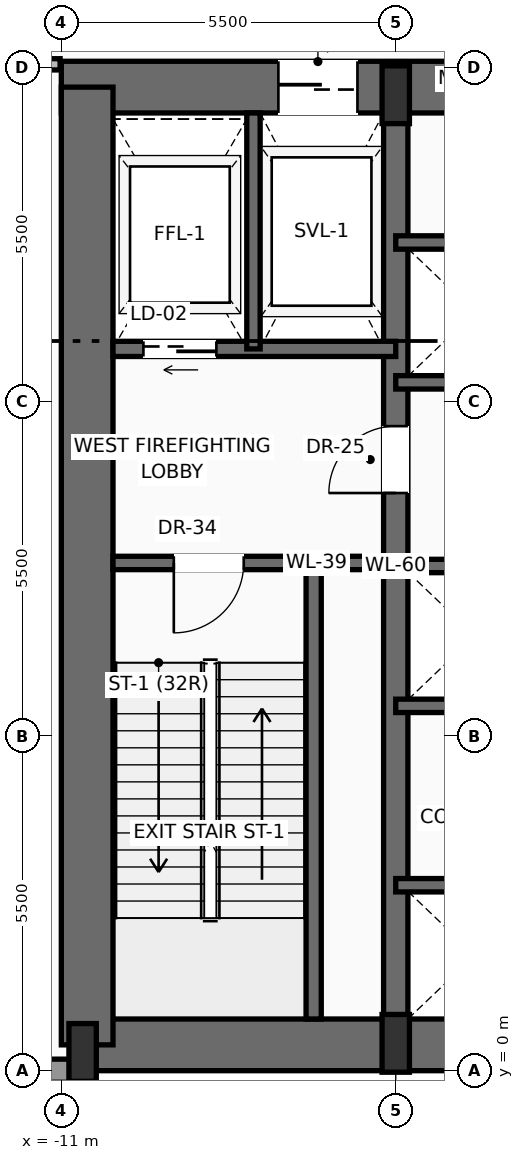
"""IFC4 building model, lengths in metres.
Left out: names, types, materials, properties, quantities, classifications, styles, units other than length and angle.
Written with IfcOpenShell. Run it as: python <this file> out.ifc"""

import sys

from ifc_helpers import new_model, si_unit, direction, frame, frame_2d, origin, origin_2d, place, context, subcontext, project, spatial, rectangle, extrude, source, transform, mapped, element, fill, save


model = new_model("IFC4")
c1 = context("Model", 3, precision=1e-05, world=origin(), true_north=direction((0.0, 1.0)))
c2 = subcontext(c1, "Body", "Model", "MODEL_VIEW")
j1 = project(units=[si_unit("LENGTHUNIT", "METRE"), si_unit("PLANEANGLEUNIT", "RADIAN")], contexts=[c1])
p1 = place(None, origin())
s1 = spatial("IfcSite", under=j1, at=p1, CompositionType="ELEMENT")
p2 = place(p1, origin())
s2 = spatial("IfcBuilding", under=s1, at=p2, CompositionType="ELEMENT")
p3 = place(p2, frame((0.0, 0.0, 5.5)))
s3 = spatial("IfcBuildingStorey", under=s2, at=p3, CompositionType="ELEMENT", Elevation=5.5)
p4 = place(p3, frame((-10.65, 0.425, 0.0), z_axis=(0.0, 0.0, 1.0), x_axis=(1.0, 0.0, 0.0)))
e1 = element("IfcWall", 1, at=p4, inside=s3, PredefinedType="SHEAR", context=c2, shape_type="SweptSolid", body=[
    extrude(rectangle(XDim=21.3, YDim=0.85, at=frame_2d((10.65, 0.0))), origin(), (0.0, 0.0, 1.0), 5.17),
])
p5 = place(p3, frame((-11.0, 16.175, 0.0), z_axis=(0.0, 0.0, 1.0), x_axis=(1.0, 0.0, 0.0)))
e2 = element("IfcWall", 2, at=p5, inside=s3, PredefinedType="SHEAR", context=c2, shape_type="SweptSolid", body=[
    extrude(rectangle(XDim=22.0, YDim=0.85, at=frame_2d((11.0, 0.0))), origin(), (0.0, 0.0, 1.0), 5.17),
])
p6 = place(p5, frame((3.57, 0.0, 0.0)))
e3 = element("IfcOpeningElement", 3, at=p6, cuts=e2, PredefinedType="OPENING", context=c2, shape_type="SweptSolid", body=[
    extrude(rectangle(XDim=1.3, YDim=2.3, at=frame_2d((0.65, 1.15))), frame((0.0, 0.435, 0.0), z_axis=(0.0, -1.0, 0.0), x_axis=(1.0, 0.0, 0.0)), (0.0, 0.0, 1.0), 0.87),
])
p7 = place(p5, frame((10.0, 0.0, 0.0)))
e4 = element("IfcOpeningElement", 4, at=p7, cuts=e2, PredefinedType="OPENING", context=c2, shape_type="SweptSolid", body=[
    extrude(rectangle(XDim=2.0, YDim=2.4, at=frame_2d((1.0, 1.2))), frame((0.0, 0.435, 0.0), z_axis=(0.0, -1.0, 0.0), x_axis=(1.0, 0.0, 0.0)), (0.0, 0.0, 1.0), 0.87),
])
p8 = place(p3, frame((-10.575, 0.425, 0.0), z_axis=(0.0, 0.0, 1.0), x_axis=(0.0, 1.0, 0.0)))
e5 = element("IfcWall", 5, at=p8, inside=s3, PredefinedType="SHEAR", context=c2, shape_type="SweptSolid", body=[
    extrude(rectangle(XDim=15.75, YDim=0.85, at=frame_2d((7.875, 0.0))), origin(), (0.0, 0.0, 1.0), 5.17),
])
p9 = place(p3, frame((-5.5, 0.425, 0.0), z_axis=(0.0, 0.0, 1.0), x_axis=(0.0, 1.0, 0.0)))
e6 = element("IfcWall", 6, at=p9, inside=s3, PredefinedType="SHEAR", context=c2, shape_type="SweptSolid", body=[
    extrude(rectangle(XDim=15.75, YDim=0.4, at=frame_2d((7.875, 0.0))), origin(), (0.0, 0.0, 1.0), 5.17),
])
p10 = place(p9, frame((9.075, 0.0, 0.0)))
e7 = element("IfcOpeningElement", 7, at=p10, cuts=e6, PredefinedType="OPENING", context=c2, shape_type="SweptSolid", body=[
    extrude(rectangle(XDim=1.1, YDim=2.2, at=frame_2d((0.55, 1.1))), frame((0.0, 0.21, 0.0), z_axis=(0.0, -1.0, 0.0), x_axis=(1.0, 0.0, 0.0)), (0.0, 0.0, 1.0), 0.42),
])
m1 = source(origin(), c2, "Body", "SweptSolid", [
    extrude(rectangle(XDim=0.45, YDim=0.95, at=origin_2d()), origin(), (0.0, 0.0, 1.0), 5.5),
])
for number, where, z_axis, x_axis in (
    (8, (-10.65, 0.3, 0.0), (0.0, 0.0, 1.0), (1.0, 0.0, 0.0)),
    (9, (-5.5, 0.45, 0.0), (0.0, 0.0, 1.0), (1.0, 0.0, 0.0)),
    (10, (-5.5, 16.05, 0.0), (0.0, 0.0, 1.0), (1.0, 0.0, 0.0)),
):
    element("IfcColumn", number, at=place(p3, frame(where, z_axis=z_axis, x_axis=x_axis)), inside=s3, PredefinedType="PILASTER", context=c2, shape_type="MappedRepresentation", body=[
        mapped(m1, transform((0.0, 0.0, 0.0), scale=1.0)),
    ])
p11 = place(p3, frame((-10.55, 0.0, 0.0), z_axis=(0.0, 0.0, 1.0), x_axis=(-1.0, 0.0, 0.0)))
e11 = element("IfcWall", 11, at=p11, inside=s3, PredefinedType="SOLIDWALL", context=c2, shape_type="SweptSolid", body=[
    extrude(rectangle(XDim=19.4, YDim=0.38, at=frame_2d((9.7, 0.0))), origin(), (0.0, 0.0, 1.0), 4.11),
])
p12 = place(p11, frame((8.8, 0.0, 0.95)))
e12 = element("IfcOpeningElement", 12, at=p12, cuts=e11, PredefinedType="OPENING", context=c2, shape_type="SweptSolid", body=[
    extrude(rectangle(XDim=1.8, YDim=2.4, at=frame_2d((0.9, 1.2))), frame((0.0, 0.2, 0.0), z_axis=(0.0, -1.0, 0.0), x_axis=(1.0, 0.0, 0.0)), (0.0, 0.0, 1.0), 0.4),
])
p13 = place(p3, frame((-6.85, 0.85, 0.0), z_axis=(0.0, 0.0, 1.0), x_axis=(0.0, 1.0, 0.0)))
e13 = element("IfcWall", 13, at=p13, inside=s3, PredefinedType="SOLIDWALL", context=c2, shape_type="SweptSolid", body=[
    extrude(rectangle(XDim=7.5, YDim=0.25, at=frame_2d((3.75, 0.0))), origin(), (0.0, 0.0, 1.0), 5.17),
])
p14 = place(p3, frame((-5.5, 8.35, 0.0), z_axis=(0.0, 0.0, 1.0), x_axis=(-1.0, 0.0, 0.0)))
e14 = element("IfcWall", 14, at=p14, inside=s3, PredefinedType="SOLIDWALL", context=c2, shape_type="SweptSolid", body=[
    extrude(rectangle(XDim=4.65, YDim=0.22, at=frame_2d((2.325, 0.0))), origin(), (0.0, 0.0, 1.0), 5.17),
])
p15 = place(p14, frame((2.5, 0.0, 0.0)))
e15 = element("IfcOpeningElement", 15, at=p15, cuts=e14, PredefinedType="OPENING", context=c2, shape_type="SweptSolid", body=[
    extrude(rectangle(XDim=1.15, YDim=2.2, at=frame_2d((0.575, 1.1))), frame((0.0, 0.12, 0.0), z_axis=(0.0, -1.0, 0.0), x_axis=(1.0, 0.0, 0.0)), (0.0, 0.0, 1.0), 0.24),
])
p16 = place(p3, frame((-5.5, 11.87, 0.0), z_axis=(0.0, 0.0, 1.0), x_axis=(-1.0, 0.0, 0.0)))
e16 = element("IfcWall", 16, at=p16, inside=s3, PredefinedType="SOLIDWALL", context=c2, shape_type="SweptSolid", body=[
    extrude(rectangle(XDim=4.65, YDim=0.25, at=frame_2d((2.325, 0.0))), origin(), (0.0, 0.0, 1.0), 5.17),
])
p17 = place(p16, frame((2.95, 0.0, 0.0)))
e17 = element("IfcOpeningElement", 17, at=p17, cuts=e16, PredefinedType="OPENING", context=c2, shape_type="SweptSolid", body=[
    extrude(rectangle(XDim=1.2, YDim=2.25, at=frame_2d((0.6, 1.125))), frame((0.0, 0.135, 0.0), z_axis=(0.0, -1.0, 0.0), x_axis=(1.0, 0.0, 0.0)), (0.0, 0.0, 1.0), 0.27),
])
p18 = place(p3, frame((-7.84, 11.87, 0.0), z_axis=(0.0, 0.0, 1.0), x_axis=(0.0, 1.0, 0.0)))
e18 = element("IfcWall", 18, at=p18, inside=s3, PredefinedType="SOLIDWALL", context=c2, shape_type="SweptSolid", body=[
    extrude(rectangle(XDim=3.88, YDim=0.22, at=frame_2d((1.94, 0.0))), origin(), (0.0, 0.0, 1.0), 5.17),
])
for number, where, z_axis, x_axis in (
    (19, (-5.5, 3.05, 0.0), (0.0, 0.0, 1.0), (1.0, 0.0, 0.0)),
    (20, (-5.5, 6.0, 0.0), (0.0, 0.0, 1.0), (1.0, 0.0, 0.0)),
    (21, (-5.5, 8.3, 0.0), (0.0, 0.0, 1.0), (1.0, 0.0, 0.0)),
    (22, (-5.5, 11.32, 0.0), (0.0, 0.0, 1.0), (1.0, 0.0, 0.0)),
    (23, (-5.5, 13.62, 0.0), (0.0, 0.0, 1.0), (1.0, 0.0, 0.0)),
):
    element("IfcWall", number, at=place(p3, frame(where, z_axis=z_axis, x_axis=x_axis)), inside=s3, PredefinedType="SOLIDWALL", context=c2, shape_type="SweptSolid", body=[
        extrude(rectangle(XDim=7.32, YDim=0.22, at=frame_2d((3.66, 0.0))), origin(), (0.0, 0.0, 1.0), 5.17),
    ])
p19 = place(p3, frame((-22.5, 16.55, 0.0), z_axis=(0.0, 0.0, 1.0), x_axis=(1.0, 0.0, 0.0)))
e24 = element("IfcWall", 24, at=p19, inside=s3, PredefinedType="PARTITIONING", context=c2, shape_type="SweptSolid", body=[
    extrude(rectangle(XDim=11.48, YDim=0.185, at=frame_2d((5.74, 0.0))), origin(), (0.0, 0.0, 1.0), 4.122),
])
p20 = place(p19, frame((5.265, 0.0, 0.0)))
e25 = element("IfcOpeningElement", 25, at=p20, cuts=e24, PredefinedType="OPENING", context=c2, shape_type="SweptSolid", body=[
    extrude(rectangle(XDim=0.95, YDim=2.2, at=frame_2d((0.475, 1.1))), frame((0.0, 0.103, 0.0), z_axis=(0.0, -1.0, 0.0), x_axis=(1.0, 0.0, 0.0)), (0.0, 0.0, 1.0), 0.205),
])
m2 = source(origin(), c2, "Body", "SweptSolid", [
    extrude(rectangle(XDim=1.15, YDim=2.2, at=frame_2d((0.575, 1.1))), frame((0.0, 0.025, 0.0), z_axis=(0.0, -1.0, 0.0), x_axis=(1.0, 0.0, 0.0)), (0.0, 0.0, 1.0), 0.05),
])
p21 = place(p15, origin())
e26 = element("IfcDoor", 26, at=p21, inside=s3, OperationType="SINGLE_SWING_RIGHT", PredefinedType="DOOR", context=c2, shape_type="MappedRepresentation", body=[
    mapped(m2, transform((0.0, 0.0, 0.0), scale=1.0)),
])
fill(e15, e26)
m3 = source(origin(), c2, "Body", "SweptSolid", [
    extrude(rectangle(XDim=1.1, YDim=2.2, at=frame_2d((0.55, 1.1))), frame((0.0, 0.025, 0.0), z_axis=(0.0, -1.0, 0.0), x_axis=(1.0, 0.0, 0.0)), (0.0, 0.0, 1.0), 0.05),
])
p22 = place(p10, origin())
e27 = element("IfcDoor", 27, at=p22, inside=s3, OperationType="SINGLE_SWING_LEFT", PredefinedType="DOOR", context=c2, shape_type="MappedRepresentation", body=[
    mapped(m3, transform((0.0, 0.0, 0.0), scale=1.0)),
])
fill(e7, e27)
m4 = source(origin(), c2, "Body", "SweptSolid", [
    extrude(rectangle(XDim=1.2, YDim=2.25, at=frame_2d((0.6, 1.125))), frame((0.0, 0.025, 0.0), z_axis=(0.0, -1.0, 0.0), x_axis=(1.0, 0.0, 0.0)), (0.0, 0.0, 1.0), 0.05),
])
p23 = place(p17, origin())
e28 = element("IfcDoor", 28, at=p23, inside=s3, OperationType="SLIDING_TO_LEFT", PredefinedType="DOOR", context=c2, shape_type="MappedRepresentation", body=[
    mapped(m4, transform((0.0, 0.0, 0.0), scale=1.0)),
])
fill(e17, e28)
m5 = source(origin(), c2, "Body", "SweptSolid", [
    extrude(rectangle(XDim=1.3, YDim=2.3, at=frame_2d((0.65, 1.15))), frame((0.0, 0.025, 0.0), z_axis=(0.0, -1.0, 0.0), x_axis=(1.0, 0.0, 0.0)), (0.0, 0.0, 1.0), 0.05),
])
p24 = place(p6, origin())
e29 = element("IfcDoor", 29, at=p24, inside=s3, OperationType="SLIDING_TO_RIGHT", PredefinedType="DOOR", context=c2, shape_type="MappedRepresentation", body=[
    mapped(m5, transform((0.0, 0.0, 0.0), scale=1.0)),
])
fill(e3, e29)
save(model, sys.argv[1])
